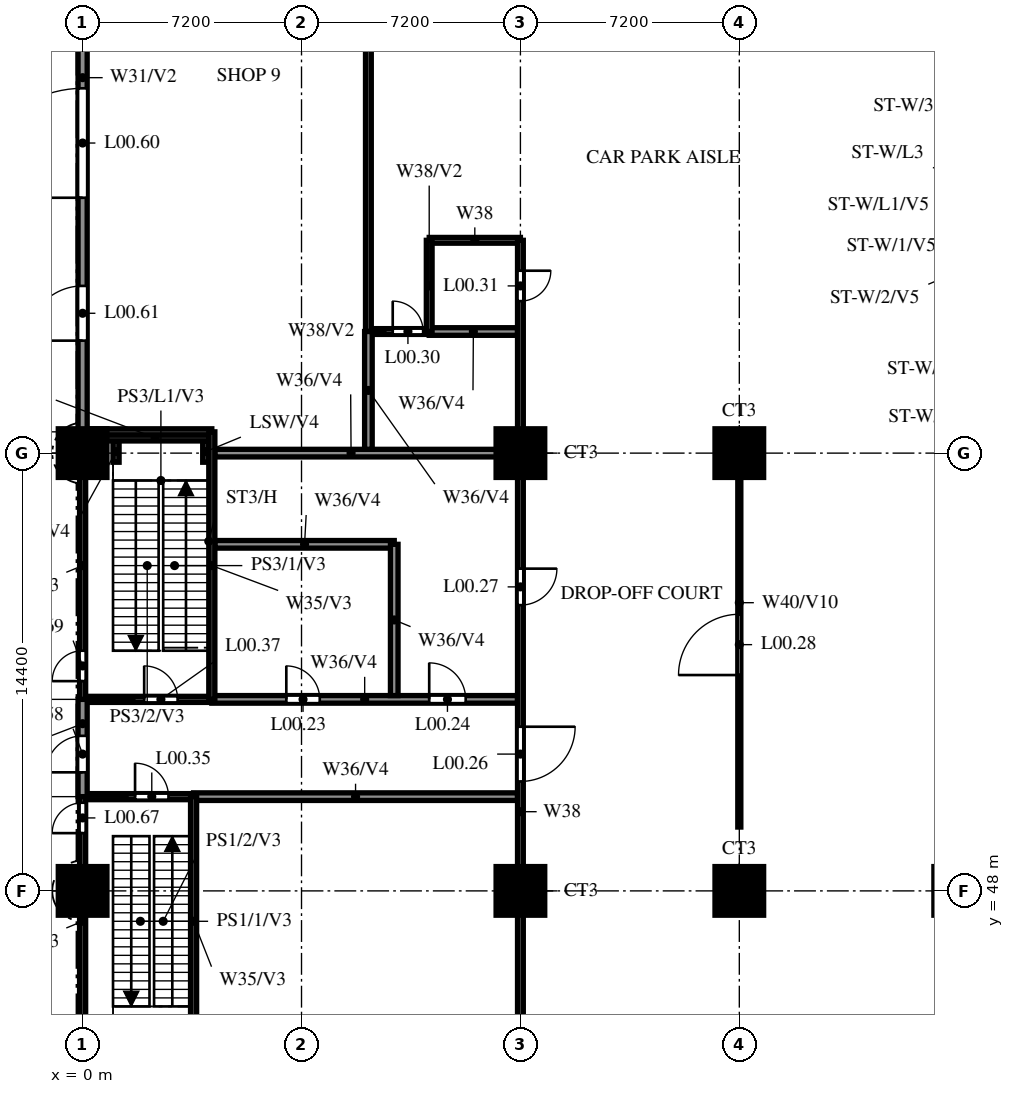
"""IFC4 building model, lengths in metres.
Left out: names, types, materials, properties, quantities, classifications, styles, units other than length and angle.
Written with IfcOpenShell. Run it as: python <this file> out.ifc"""

import sys

from ifc_helpers import new_model, si_unit, direction, frame, frame_2d, origin, origin_2d, place, context, subcontext, project, spatial, rectangle, circle, extrude, source, transform, mapped, element, fill, save


model = new_model("IFC4")
c1 = context("Model", 3, precision=1e-05, world=origin(), true_north=direction((0.0, 1.0)))
c2 = subcontext(c1, "Body", "Model", "MODEL_VIEW")
j1 = project(units=[si_unit("LENGTHUNIT", "METRE"), si_unit("PLANEANGLEUNIT", "RADIAN")], contexts=[c1])
p1 = place(None, origin())
s1 = spatial("IfcSite", under=j1, at=p1, CompositionType="ELEMENT")
p2 = place(p1, origin())
s2 = spatial("IfcBuilding", under=s1, at=p2, CompositionType="ELEMENT")
p3 = place(p2, origin())
s3 = spatial("IfcBuildingStorey", under=s2, at=p3, CompositionType="ELEMENT", Elevation=0.0)
m1 = source(origin(), c2, "Body", "SweptSolid", [
    extrude(circle(Radius=0.8, at=origin_2d()), origin(), (0.0, 0.0, 1.0), 7.4),
])
for number, where, z_axis, x_axis in (
    (1, (0.0, 48.0, 0.0), (0.0, 0.0, 1.0), (1.0, 0.0, 0.0)),
    (2, (14.4, 48.0, 0.0), (0.0, 0.0, 1.0), (1.0, 0.0, 0.0)),
    (3, (21.6, 48.0, 0.0), (0.0, 0.0, 1.0), (1.0, 0.0, 0.0)),
    (4, (0.0, 62.4, 0.0), (0.0, 0.0, 1.0), (1.0, 0.0, 0.0)),
    (5, (14.4, 62.4, 0.0), (0.0, 0.0, 1.0), (1.0, 0.0, 0.0)),
    (6, (21.6, 62.4, 0.0), (0.0, 0.0, 1.0), (1.0, 0.0, 0.0)),
):
    element("IfcColumn", number, at=place(p3, frame(where, z_axis=z_axis, x_axis=x_axis)), inside=s3, PredefinedType="COLUMN", context=c2, shape_type="MappedRepresentation", body=[
        mapped(m1, transform((0.0, 0.0, 0.0))),
    ])
for number, where, z_axis, x_axis in (
    (7, (1.1, 62.1, 0.0), (0.0, 0.0, 1.0), (0.0, 1.0, 0.0)),
    (8, (4.05, 62.1, 0.0), (0.0, 0.0, 1.0), (0.0, 1.0, 0.0)),
):
    element("IfcWall", number, at=place(p3, frame(where, z_axis=z_axis, x_axis=x_axis)), inside=s3, PredefinedType="SOLIDWALL", context=c2, shape_type="SweptSolid", body=[
        extrude(rectangle(XDim=0.7, YDim=0.2, at=frame_2d((0.35, 0.0))), origin(), (0.0, 0.0, 1.0), 3.7),
    ])
p4 = place(p3, frame((0.624, 62.9, 0.0), z_axis=(0.0, 0.0, 1.0), x_axis=(1.0, 0.0, 0.0)))
e9 = element("IfcWall", 9, at=p4, inside=s3, PredefinedType="SOLIDWALL", context=c2, shape_type="SweptSolid", body=[
    extrude(rectangle(XDim=3.526, YDim=0.2, at=frame_2d((1.763, 0.0))), origin(), (0.0, 0.0, 1.0), 3.7),
])
p5 = place(p3, frame((3.65, 51.1, 0.0), z_axis=(0.0, 0.0, 1.0), x_axis=(1.0, 0.0, 0.0)))
e10 = element("IfcWall", 10, at=p5, inside=s3, PredefinedType="SOLIDWALL", context=c2, shape_type="SweptSolid", body=[
    extrude(rectangle(XDim=10.655, YDim=0.25, at=frame_2d((5.328, 0.0))), origin(), (0.0, 0.0, 1.0), 7.4),
])
p6 = place(p3, frame((0.0, 51.1, 0.0), z_axis=(0.0, 0.0, 1.0), x_axis=(1.0, 0.0, 0.0)))
e11 = element("IfcWall", 11, at=p6, inside=s3, PredefinedType="SOLIDWALL", context=c2, shape_type="SweptSolid", body=[
    extrude(rectangle(XDim=3.65, YDim=0.2, at=frame_2d((1.825, 0.0))), origin(), (0.0, 0.0, 1.0), 7.4),
])
p7 = place(p6, frame((1.725, 0.0, 0.0)))
e12 = element("IfcOpeningElement", 12, at=p7, cuts=e11, PredefinedType="OPENING", context=c2, shape_type="SweptSolid", body=[
    extrude(rectangle(XDim=1.1, YDim=2.1, at=frame_2d((0.55, 1.05))), frame((0.0, 0.11, 0.0), z_axis=(0.0, -1.0, 0.0), x_axis=(1.0, 0.0, 0.0)), (0.0, 0.0, 1.0), 0.22),
])
p8 = place(p3, frame((4.25, 54.3, 0.0), z_axis=(0.0, 0.0, 1.0), x_axis=(1.0, 0.0, 0.0)))
e13 = element("IfcWall", 13, at=p8, inside=s3, PredefinedType="SOLIDWALL", context=c2, shape_type="SweptSolid", body=[
    extrude(rectangle(XDim=10.055, YDim=0.25, at=frame_2d((5.027, 0.0))), origin(), (0.0, 0.0, 1.0), 7.4),
])
p9 = place(p8, frame((2.45, 0.0, 0.0)))
e14 = element("IfcOpeningElement", 14, at=p9, cuts=e13, PredefinedType="OPENING", context=c2, shape_type="SweptSolid", body=[
    extrude(rectangle(XDim=1.1, YDim=2.1, at=frame_2d((0.55, 1.05))), frame((0.0, 0.135, 0.0), z_axis=(0.0, -1.0, 0.0), x_axis=(1.0, 0.0, 0.0)), (0.0, 0.0, 1.0), 0.27),
])
p10 = place(p8, frame((7.15, 0.0, 0.0)))
e15 = element("IfcOpeningElement", 15, at=p10, cuts=e13, PredefinedType="OPENING", context=c2, shape_type="SweptSolid", body=[
    extrude(rectangle(XDim=1.2, YDim=2.1, at=frame_2d((0.6, 1.05))), frame((0.0, 0.135, 0.0), z_axis=(0.0, -1.0, 0.0), x_axis=(1.0, 0.0, 0.0)), (0.0, 0.0, 1.0), 0.27),
])
p11 = place(p3, frame((0.0, 54.3, 0.0), z_axis=(0.0, 0.0, 1.0), x_axis=(1.0, 0.0, 0.0)))
e16 = element("IfcWall", 16, at=p11, inside=s3, PredefinedType="SOLIDWALL", context=c2, shape_type="SweptSolid", body=[
    extrude(rectangle(XDim=4.25, YDim=0.2, at=frame_2d((2.125, 0.0))), origin(), (0.0, 0.0, 1.0), 7.4),
])
p12 = place(p11, frame((2.025, 0.0, 0.0)))
e17 = element("IfcOpeningElement", 17, at=p12, cuts=e16, PredefinedType="OPENING", context=c2, shape_type="SweptSolid", body=[
    extrude(rectangle(XDim=1.1, YDim=2.1, at=frame_2d((0.55, 1.05))), frame((0.0, 0.11, 0.0), z_axis=(0.0, -1.0, 0.0), x_axis=(1.0, 0.0, 0.0)), (0.0, 0.0, 1.0), 0.22),
])
p13 = place(p3, frame((4.35, 59.4, 0.0), z_axis=(0.0, 0.0, 1.0), x_axis=(1.0, 0.0, 0.0)))
e18 = element("IfcWall", 18, at=p13, inside=s3, PredefinedType="SOLIDWALL", context=c2, shape_type="SweptSolid", body=[
    extrude(rectangle(XDim=5.9, YDim=0.25, at=frame_2d((2.95, 0.0))), origin(), (0.0, 0.0, 1.0), 7.4),
])
p14 = place(p3, frame((4.35, 62.4, 0.0), z_axis=(0.0, 0.0, 1.0), x_axis=(1.0, 0.0, 0.0)))
e19 = element("IfcWall", 19, at=p14, inside=s3, PredefinedType="SOLIDWALL", context=c2, shape_type="SweptSolid", body=[
    extrude(rectangle(XDim=9.955, YDim=0.25, at=frame_2d((4.978, 0.0))), origin(), (0.0, 0.0, 1.0), 7.4),
])
p15 = place(p3, frame((0.0, 63.1, 0.0), z_axis=(0.0, 0.0, 1.0), x_axis=(1.0, 0.0, 0.0)))
e20 = element("IfcWall", 20, at=p15, inside=s3, PredefinedType="SOLIDWALL", context=c2, shape_type="SweptSolid", body=[
    extrude(rectangle(XDim=4.25, YDim=0.2, at=frame_2d((2.125, 0.0))), origin(), (0.0, 0.0, 1.0), 7.4),
])
p16 = place(p3, frame((9.4, 66.4, 0.0), z_axis=(0.0, 0.0, 1.0), x_axis=(1.0, 0.0, 0.0)))
e21 = element("IfcWall", 21, at=p16, inside=s3, PredefinedType="PARTITIONING", context=c2, shape_type="SweptSolid", body=[
    extrude(rectangle(XDim=2.0, YDim=0.19, at=frame_2d((1.0, 0.0))), origin(), (0.0, 0.0, 1.0), 7.4),
])
p17 = place(p16, frame((0.8, 0.0, 0.0)))
e22 = element("IfcOpeningElement", 22, at=p17, cuts=e21, PredefinedType="OPENING", context=c2, shape_type="SweptSolid", body=[
    extrude(rectangle(XDim=1.0, YDim=2.1, at=frame_2d((0.5, 1.05))), frame((0.0, 0.105, 0.0), z_axis=(0.0, -1.0, 0.0), x_axis=(1.0, 0.0, 0.0)), (0.0, 0.0, 1.0), 0.21),
])
p18 = place(p3, frame((11.4, 66.4, 0.0), z_axis=(0.0, 0.0, 1.0), x_axis=(1.0, 0.0, 0.0)))
e23 = element("IfcWall", 23, at=p18, inside=s3, PredefinedType="SOLIDWALL", context=c2, shape_type="SweptSolid", body=[
    extrude(rectangle(XDim=2.905, YDim=0.25, at=frame_2d((1.453, 0.0))), origin(), (0.0, 0.0, 1.0), 7.4),
])
p19 = place(p3, frame((11.4, 69.4, 0.0), z_axis=(0.0, 0.0, 1.0), x_axis=(1.0, 0.0, 0.0)))
e24 = element("IfcWall", 24, at=p19, inside=s3, PredefinedType="PARTITIONING", context=c2, shape_type="SweptSolid", body=[
    extrude(rectangle(XDim=3.0, YDim=0.19, at=frame_2d((1.5, 0.0))), origin(), (0.0, 0.0, 1.0), 6.2),
])
p20 = place(p3, frame((0.0, 51.1, 0.0), z_axis=(0.0, 0.0, 1.0), x_axis=(0.0, 1.0, 0.0)))
e25 = element("IfcWall", 25, at=p20, inside=s3, PredefinedType="SOLIDWALL", context=c2, shape_type="SweptSolid", body=[
    extrude(rectangle(XDim=3.2, YDim=0.3, at=frame_2d((1.6, 0.0))), origin(), (0.0, 0.0, 1.0), 7.4),
])
p21 = place(p20, frame((0.8, 0.0, 0.0)))
e26 = element("IfcOpeningElement", 26, at=p21, cuts=e25, PredefinedType="OPENING", context=c2, shape_type="SweptSolid", body=[
    extrude(rectangle(XDim=1.2, YDim=2.1, at=frame_2d((0.6, 1.05))), frame((0.0, 0.16, 0.0), z_axis=(0.0, -1.0, 0.0), x_axis=(1.0, 0.0, 0.0)), (0.0, 0.0, 1.0), 0.32),
])
p22 = place(p3, frame((0.0, 63.1, 0.0), z_axis=(0.0, 0.0, 1.0), x_axis=(0.0, 1.0, 0.0)))
e27 = element("IfcWall", 27, at=p22, inside=s3, PredefinedType="SOLIDWALL", context=c2, shape_type="SweptSolid", body=[
    extrude(rectangle(XDim=23.3, YDim=0.3, at=frame_2d((11.65, 0.0))), origin(), (0.0, 0.0, 1.0), 7.4),
])
p23 = place(p22, frame((7.7, 0.0, 0.0)))
e28 = element("IfcOpeningElement", 28, at=p23, cuts=e27, PredefinedType="OPENING", context=c2, shape_type="SweptSolid", body=[
    extrude(rectangle(XDim=3.6, YDim=3.0, at=frame_2d((1.8, 1.5))), frame((0.0, 0.16, 0.0), z_axis=(0.0, -1.0, 0.0), x_axis=(1.0, 0.0, 0.0)), (0.0, 0.0, 1.0), 0.32),
])
p24 = place(p22, frame((3.0, 0.0, 0.0)))
e29 = element("IfcOpeningElement", 29, at=p24, cuts=e27, PredefinedType="OPENING", context=c2, shape_type="SweptSolid", body=[
    extrude(rectangle(XDim=1.8, YDim=2.1, at=frame_2d((0.9, 1.05))), frame((0.0, 0.16, 0.0), z_axis=(0.0, -1.0, 0.0), x_axis=(1.0, 0.0, 0.0)), (0.0, 0.0, 1.0), 0.32),
])
p25 = place(p3, frame((0.0, 42.9, 0.0), z_axis=(0.0, 0.0, 1.0), x_axis=(0.0, 1.0, 0.0)))
e30 = element("IfcWall", 30, at=p25, inside=s3, PredefinedType="SOLIDWALL", context=c2, shape_type="SweptSolid", body=[
    extrude(rectangle(XDim=8.2, YDim=0.2, at=frame_2d((4.1, 0.0))), origin(), (0.0, 0.0, 1.0), 7.4),
])
p26 = place(p25, frame((7.0, 0.0, 0.0)))
e31 = element("IfcOpeningElement", 31, at=p26, cuts=e30, PredefinedType="OPENING", context=c2, shape_type="SweptSolid", body=[
    extrude(rectangle(XDim=1.0, YDim=2.1, at=frame_2d((0.5, 1.05))), frame((0.0, 0.11, 0.0), z_axis=(0.0, -1.0, 0.0), x_axis=(1.0, 0.0, 0.0)), (0.0, 0.0, 1.0), 0.22),
])
p27 = place(p3, frame((0.0, 54.3, 0.0), z_axis=(0.0, 0.0, 1.0), x_axis=(0.0, 1.0, 0.0)))
e32 = element("IfcWall", 32, at=p27, inside=s3, PredefinedType="SOLIDWALL", context=c2, shape_type="SweptSolid", body=[
    extrude(rectangle(XDim=8.8, YDim=0.2, at=frame_2d((4.4, 0.0))), origin(), (0.0, 0.0, 1.0), 7.4),
])
p28 = place(p27, frame((0.6, 0.0, 0.0)))
e33 = element("IfcOpeningElement", 33, at=p28, cuts=e32, PredefinedType="OPENING", context=c2, shape_type="SweptSolid", body=[
    extrude(rectangle(XDim=1.0, YDim=2.1, at=frame_2d((0.5, 1.05))), frame((0.0, 0.11, 0.0), z_axis=(0.0, -1.0, 0.0), x_axis=(1.0, 0.0, 0.0)), (0.0, 0.0, 1.0), 0.22),
])
p29 = place(p3, frame((3.65, 42.9, 0.0), z_axis=(0.0, 0.0, 1.0), x_axis=(0.0, 1.0, 0.0)))
e34 = element("IfcWall", 34, at=p29, inside=s3, PredefinedType="SOLIDWALL", context=c2, shape_type="SweptSolid", body=[
    extrude(rectangle(XDim=8.2, YDim=0.2, at=frame_2d((4.1, 0.0))), origin(), (0.0, 0.0, 1.0), 7.4),
])
p30 = place(p3, frame((4.25, 54.3, 0.0), z_axis=(0.0, 0.0, 1.0), x_axis=(0.0, 1.0, 0.0)))
e35 = element("IfcWall", 35, at=p30, inside=s3, PredefinedType="SOLIDWALL", context=c2, shape_type="SweptSolid", body=[
    extrude(rectangle(XDim=8.8, YDim=0.2, at=frame_2d((4.4, 0.0))), origin(), (0.0, 0.0, 1.0), 7.4),
])
p31 = place(p3, frame((9.4, 66.4, 0.0), z_axis=(0.0, 0.0, 1.0), x_axis=(0.0, 1.0, 0.0)))
e36 = element("IfcWall", 36, at=p31, inside=s3, PredefinedType="PARTITIONING", context=c2, shape_type="SweptSolid", body=[
    extrude(rectangle(XDim=19.85, YDim=0.19, at=frame_2d((9.925, 0.0))), origin(), (0.0, 0.0, 1.0), 6.2),
])
p32 = place(p3, frame((9.4, 62.525, 0.0), z_axis=(0.0, 0.0, 1.0), x_axis=(0.0, 1.0, 0.0)))
e37 = element("IfcWall", 37, at=p32, inside=s3, PredefinedType="SOLIDWALL", context=c2, shape_type="SweptSolid", body=[
    extrude(rectangle(XDim=3.875, YDim=0.25, at=frame_2d((1.938, 0.0))), origin(), (0.0, 0.0, 1.0), 7.4),
])
p33 = place(p3, frame((10.25, 54.425, 0.0), z_axis=(0.0, 0.0, 1.0), x_axis=(0.0, 1.0, 0.0)))
e38 = element("IfcWall", 38, at=p33, inside=s3, PredefinedType="SOLIDWALL", context=c2, shape_type="SweptSolid", body=[
    extrude(rectangle(XDim=4.975, YDim=0.25, at=frame_2d((2.487, 0.0))), origin(), (0.0, 0.0, 1.0), 7.4),
])
p34 = place(p3, frame((11.4, 66.4, 0.0), z_axis=(0.0, 0.0, 1.0), x_axis=(0.0, 1.0, 0.0)))
e39 = element("IfcWall", 39, at=p34, inside=s3, PredefinedType="PARTITIONING", context=c2, shape_type="SweptSolid", body=[
    extrude(rectangle(XDim=3.0, YDim=0.19, at=frame_2d((1.5, 0.0))), origin(), (0.0, 0.0, 1.0), 7.4),
])
p35 = place(p3, frame((14.4, 69.4, 0.0), z_axis=(0.0, 0.0, 1.0), x_axis=(0.0, -1.0, 0.0)))
e40 = element("IfcWall", 40, at=p35, inside=s3, PredefinedType="PARTITIONING", context=c2, shape_type="SweptSolid", body=[
    extrude(rectangle(XDim=35.8, YDim=0.19, at=frame_2d((17.9, 0.0))), origin(), (0.0, 0.0, 1.0), 6.2),
])
p36 = place(p35, frame((16.0, 0.0, 0.0)))
e41 = element("IfcOpeningElement", 41, at=p36, cuts=e40, PredefinedType="OPENING", context=c2, shape_type="SweptSolid", body=[
    extrude(rectangle(XDim=1.8, YDim=2.1, at=frame_2d((0.9, 1.05))), frame((0.0, 0.105, 0.0), z_axis=(0.0, -1.0, 0.0), x_axis=(1.0, 0.0, 0.0)), (0.0, 0.0, 1.0), 0.21),
])
p37 = place(p35, frame((10.8, 0.0, 0.0)))
e42 = element("IfcOpeningElement", 42, at=p37, cuts=e40, PredefinedType="OPENING", context=c2, shape_type="SweptSolid", body=[
    extrude(rectangle(XDim=1.2, YDim=2.1, at=frame_2d((0.6, 1.05))), frame((0.0, 0.105, 0.0), z_axis=(0.0, -1.0, 0.0), x_axis=(1.0, 0.0, 0.0)), (0.0, 0.0, 1.0), 0.21),
])
p38 = place(p35, frame((1.0, 0.0, 0.0)))
e43 = element("IfcOpeningElement", 43, at=p38, cuts=e40, PredefinedType="OPENING", context=c2, shape_type="SweptSolid", body=[
    extrude(rectangle(XDim=1.0, YDim=2.1, at=frame_2d((0.5, 1.05))), frame((0.0, 0.105, 0.0), z_axis=(0.0, -1.0, 0.0), x_axis=(1.0, 0.0, 0.0)), (0.0, 0.0, 1.0), 0.21),
])
p39 = place(p3, frame((21.6, 50.1, 0.0), z_axis=(0.0, 0.0, 1.0), x_axis=(0.0, 1.0, 0.0)))
e44 = element("IfcWall", 44, at=p39, inside=s3, PredefinedType="PARTITIONING", context=c2, shape_type="SweptSolid", body=[
    extrude(rectangle(XDim=12.3, YDim=0.1, at=frame_2d((6.15, 0.0))), origin(), (0.0, 0.0, 1.0), 6.2),
])
p40 = place(p39, frame((5.0, 0.0, 0.0)))
e45 = element("IfcOpeningElement", 45, at=p40, cuts=e44, PredefinedType="OPENING", context=c2, shape_type="SweptSolid", body=[
    extrude(rectangle(XDim=2.0, YDim=2.1, at=frame_2d((1.0, 1.05))), frame((0.0, 0.06, 0.0), z_axis=(0.0, -1.0, 0.0), x_axis=(1.0, 0.0, 0.0)), (0.0, 0.0, 1.0), 0.12),
])
p41 = place(p9, origin())
e46 = element("IfcDoor", 46, at=p41, inside=s3, OperationType="SINGLE_SWING_LEFT", PredefinedType="DOOR", context=c2, shape_type="SweptSolid", body=[
    extrude(rectangle(XDim=1.1, YDim=2.1, at=frame_2d((0.55, 1.05))), frame((0.0, 0.025, 0.0), z_axis=(0.0, -1.0, 0.0), x_axis=(1.0, 0.0, 0.0)), (0.0, 0.0, 1.0), 0.05),
])
fill(e14, e46)
p42 = place(p10, origin())
e47 = element("IfcDoor", 47, at=p42, inside=s3, OperationType="SINGLE_SWING_RIGHT", PredefinedType="DOOR", context=c2, shape_type="SweptSolid", body=[
    extrude(rectangle(XDim=1.2, YDim=2.1, at=frame_2d((0.6, 1.05))), frame((0.0, 0.025, 0.0), z_axis=(0.0, -1.0, 0.0), x_axis=(1.0, 0.0, 0.0)), (0.0, 0.0, 1.0), 0.05),
])
fill(e15, e47)
p43 = place(p36, origin())
e48 = element("IfcDoor", 48, at=p43, inside=s3, OperationType="DOUBLE_DOOR_SINGLE_SWING", PredefinedType="DOOR", context=c2, shape_type="SweptSolid", body=[
    extrude(rectangle(XDim=1.8, YDim=2.1, at=frame_2d((0.9, 1.05))), frame((0.0, 0.025, 0.0), z_axis=(0.0, -1.0, 0.0), x_axis=(1.0, 0.0, 0.0)), (0.0, 0.0, 1.0), 0.05),
])
fill(e41, e48)
p44 = place(p37, origin())
e49 = element("IfcDoor", 49, at=p44, inside=s3, OperationType="SINGLE_SWING_LEFT", PredefinedType="DOOR", context=c2, shape_type="SweptSolid", body=[
    extrude(rectangle(XDim=1.2, YDim=2.1, at=frame_2d((0.6, 1.05))), frame((0.0, 0.025, 0.0), z_axis=(0.0, -1.0, 0.0), x_axis=(1.0, 0.0, 0.0)), (0.0, 0.0, 1.0), 0.05),
])
fill(e42, e49)
p45 = place(p40, origin())
e50 = element("IfcDoor", 50, at=p45, inside=s3, OperationType="DOUBLE_DOOR_SINGLE_SWING", PredefinedType="DOOR", context=c2, shape_type="SweptSolid", body=[
    extrude(rectangle(XDim=2.0, YDim=2.1, at=frame_2d((1.0, 1.05))), frame((0.0, 0.025, 0.0), z_axis=(0.0, -1.0, 0.0), x_axis=(1.0, 0.0, 0.0)), (0.0, 0.0, 1.0), 0.05),
])
fill(e45, e50)
p46 = place(p17, origin())
e51 = element("IfcDoor", 51, at=p46, inside=s3, OperationType="SINGLE_SWING_RIGHT", PredefinedType="DOOR", context=c2, shape_type="SweptSolid", body=[
    extrude(rectangle(XDim=1.0, YDim=2.1, at=frame_2d((0.5, 1.05))), frame((0.0, 0.025, 0.0), z_axis=(0.0, -1.0, 0.0), x_axis=(1.0, 0.0, 0.0)), (0.0, 0.0, 1.0), 0.05),
])
fill(e22, e51)
p47 = place(p38, origin())
e52 = element("IfcDoor", 52, at=p47, inside=s3, OperationType="SINGLE_SWING_LEFT", PredefinedType="DOOR", context=c2, shape_type="SweptSolid", body=[
    extrude(rectangle(XDim=1.0, YDim=2.1, at=frame_2d((0.5, 1.05))), frame((0.0, 0.025, 0.0), z_axis=(0.0, -1.0, 0.0), x_axis=(1.0, 0.0, 0.0)), (0.0, 0.0, 1.0), 0.05),
])
fill(e43, e52)
p48 = place(p7, origin())
e53 = element("IfcDoor", 53, at=p48, inside=s3, OperationType="SINGLE_SWING_RIGHT", PredefinedType="DOOR", context=c2, shape_type="SweptSolid", body=[
    extrude(rectangle(XDim=1.1, YDim=2.1, at=frame_2d((0.55, 1.05))), frame((0.0, 0.025, 0.0), z_axis=(0.0, -1.0, 0.0), x_axis=(1.0, 0.0, 0.0)), (0.0, 0.0, 1.0), 0.05),
])
fill(e12, e53)
p49 = place(p12, origin())
e54 = element("IfcDoor", 54, at=p49, inside=s3, OperationType="SINGLE_SWING_RIGHT", PredefinedType="DOOR", context=c2, shape_type="SweptSolid", body=[
    extrude(rectangle(XDim=1.1, YDim=2.1, at=frame_2d((0.55, 1.05))), frame((0.0, 0.025, 0.0), z_axis=(0.0, -1.0, 0.0), x_axis=(1.0, 0.0, 0.0)), (0.0, 0.0, 1.0), 0.05),
])
fill(e17, e54)
p50 = place(p21, origin())
e55 = element("IfcDoor", 55, at=p50, inside=s3, OperationType="SINGLE_SWING_LEFT", PredefinedType="DOOR", context=c2, shape_type="SweptSolid", body=[
    extrude(rectangle(XDim=1.2, YDim=2.1, at=frame_2d((0.6, 1.05))), frame((0.0, 0.025, 0.0), z_axis=(0.0, -1.0, 0.0), x_axis=(1.0, 0.0, 0.0)), (0.0, 0.0, 1.0), 0.05),
])
fill(e26, e55)
p51 = place(p23, origin())
e56 = element("IfcDoor", 56, at=p51, inside=s3, OperationType="SINGLE_SWING_LEFT", PredefinedType="DOOR", context=c2, shape_type="SweptSolid", body=[
    extrude(rectangle(XDim=3.6, YDim=3.0, at=frame_2d((1.8, 1.5))), frame((0.0, 0.025, 0.0), z_axis=(0.0, -1.0, 0.0), x_axis=(1.0, 0.0, 0.0)), (0.0, 0.0, 1.0), 0.05),
])
fill(e28, e56)
p52 = place(p24, origin())
e57 = element("IfcDoor", 57, at=p52, inside=s3, OperationType="DOUBLE_DOOR_SINGLE_SWING", PredefinedType="DOOR", context=c2, shape_type="SweptSolid", body=[
    extrude(rectangle(XDim=1.8, YDim=2.1, at=frame_2d((0.9, 1.05))), frame((0.0, 0.025, 0.0), z_axis=(0.0, -1.0, 0.0), x_axis=(1.0, 0.0, 0.0)), (0.0, 0.0, 1.0), 0.05),
])
fill(e29, e57)
p53 = place(p26, origin())
e58 = element("IfcDoor", 58, at=p53, inside=s3, OperationType="SINGLE_SWING_RIGHT", PredefinedType="DOOR", context=c2, shape_type="SweptSolid", body=[
    extrude(rectangle(XDim=1.0, YDim=2.1, at=frame_2d((0.5, 1.05))), frame((0.0, 0.025, 0.0), z_axis=(0.0, -1.0, 0.0), x_axis=(1.0, 0.0, 0.0)), (0.0, 0.0, 1.0), 0.05),
])
fill(e31, e58)
p54 = place(p28, origin())
e59 = element("IfcDoor", 59, at=p54, inside=s3, OperationType="SINGLE_SWING_LEFT", PredefinedType="DOOR", context=c2, shape_type="SweptSolid", body=[
    extrude(rectangle(XDim=1.0, YDim=2.1, at=frame_2d((0.5, 1.05))), frame((0.0, 0.025, 0.0), z_axis=(0.0, -1.0, 0.0), x_axis=(1.0, 0.0, 0.0)), (0.0, 0.0, 1.0), 0.05),
])
fill(e33, e59)
save(model, sys.argv[1])
